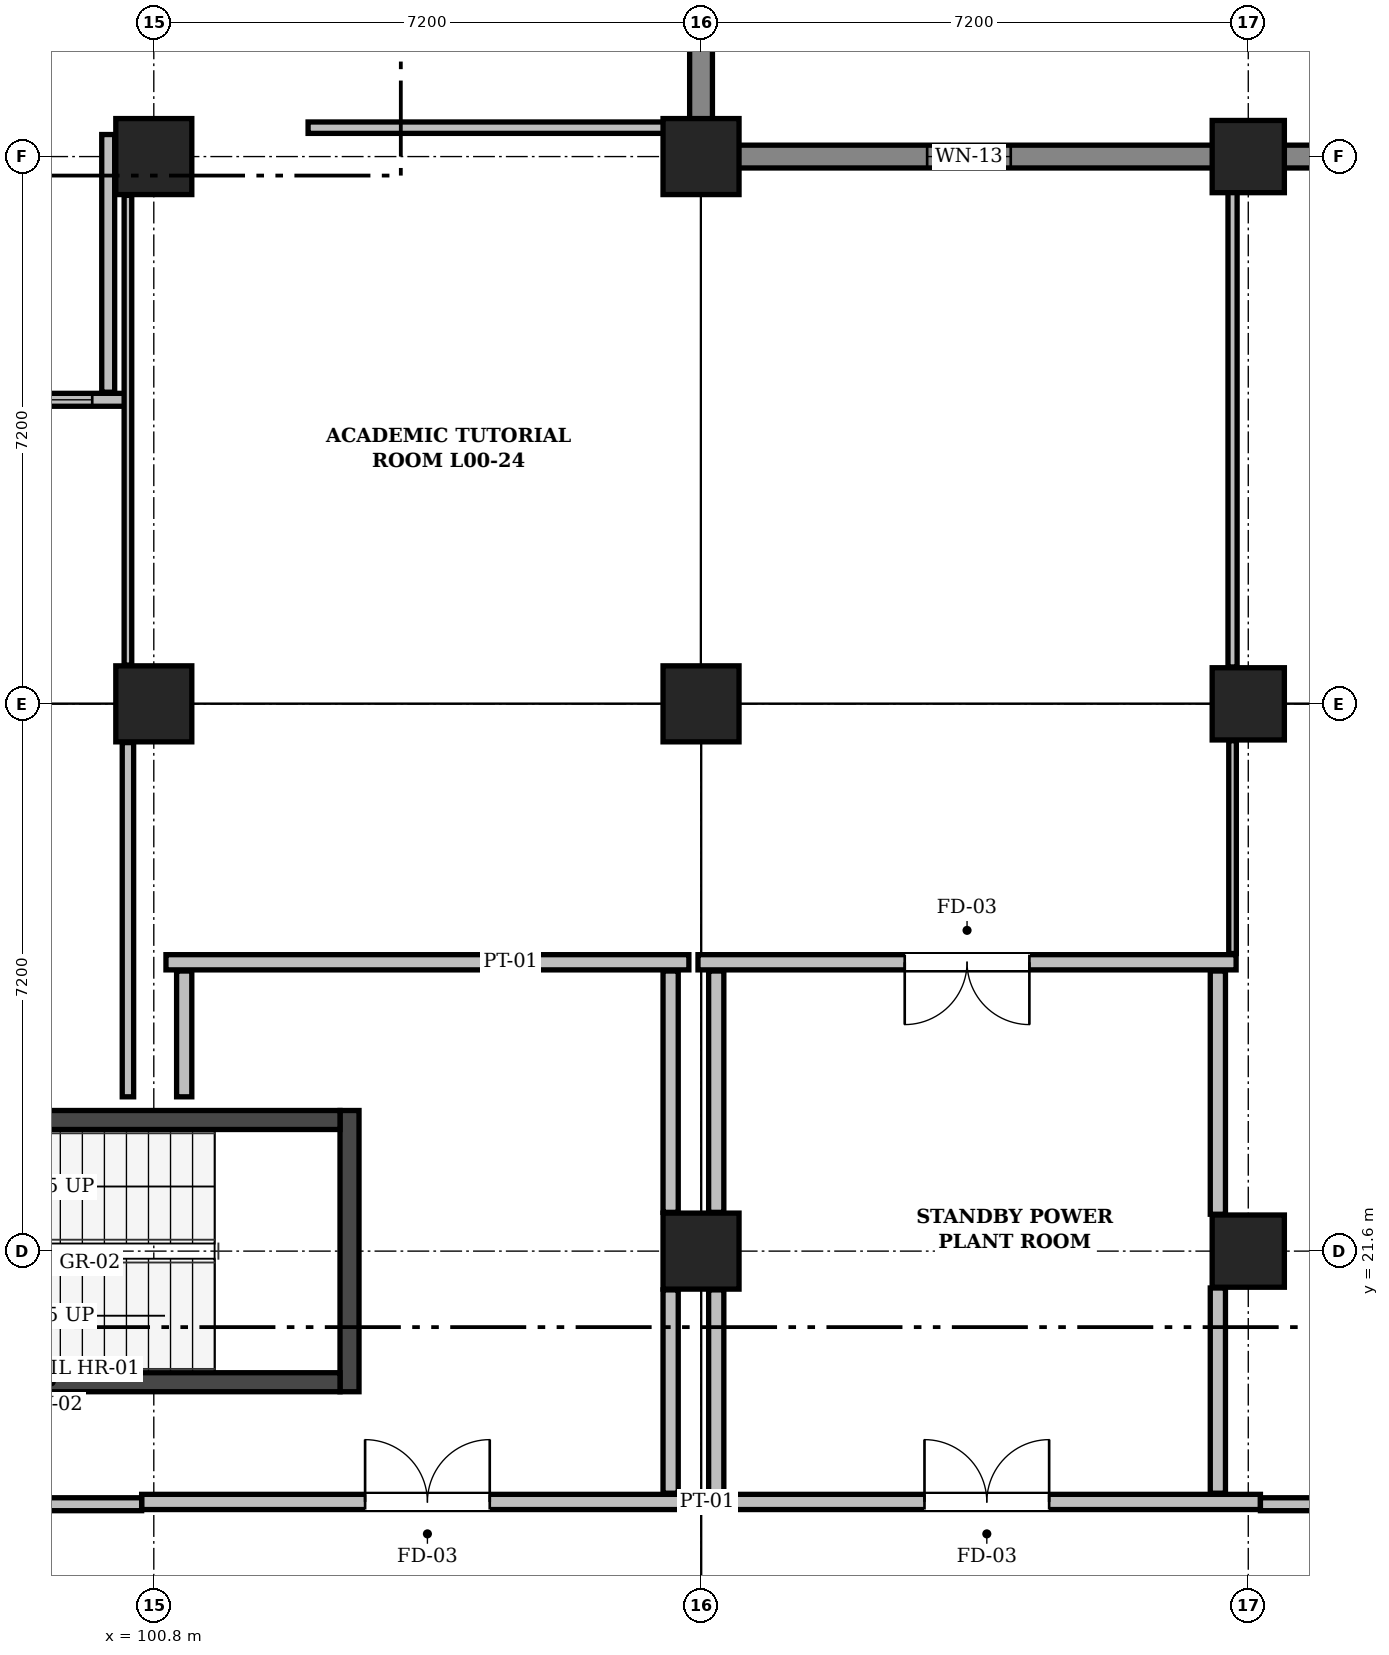
"""IFC4 building model, lengths in metres.
Left out: names, types, materials, properties, quantities, classifications, styles, units other than length and angle.
Written with IfcOpenShell. Run it as: python <this file> out.ifc"""

import sys

from ifc_helpers import new_model, si_unit, direction, frame, frame_2d, origin, origin_2d, place, context, subcontext, project, spatial, rectangle, extrude, element, fill, save


model = new_model("IFC4")
c1 = context("Model", 3, precision=1e-05, world=origin(), true_north=direction((0.0, 1.0)))
c2 = subcontext(c1, "Body", "Model", "MODEL_VIEW")
j1 = project(units=[si_unit("LENGTHUNIT", "METRE"), si_unit("PLANEANGLEUNIT", "RADIAN")], contexts=[c1])
p1 = place(None, origin())
s1 = spatial("IfcSite", under=j1, at=p1, CompositionType="ELEMENT")
p2 = place(p1, origin())
s2 = spatial("IfcBuilding", under=s1, at=p2, CompositionType="ELEMENT")
p3 = place(p2, origin())
s3 = spatial("IfcBuildingStorey", under=s2, at=p3, CompositionType="ELEMENT", Elevation=0.0)
for number, where, z_axis, x_axis in (
    (1, (100.8, 28.8, 0.0), (0.0, 0.0, 1.0), (1.0, 0.0, 0.0)),
    (2, (100.8, 36.0, 0.0), (0.0, 0.0, 1.0), (1.0, 0.0, 0.0)),
    (3, (108.0, 21.6, 0.0), (0.0, 0.0, 1.0), (1.0, 0.0, 0.0)),
    (4, (108.0, 28.8, 0.0), (0.0, 0.0, 1.0), (1.0, 0.0, 0.0)),
    (5, (108.0, 36.0, 0.0), (0.0, 0.0, 1.0), (1.0, 0.0, 0.0)),
):
    element("IfcColumn", number, at=place(p3, frame(where, z_axis=z_axis, x_axis=x_axis)), inside=s3, PredefinedType="COLUMN", context=c2, shape_type="SweptSolid", body=[
        extrude(rectangle(XDim=1.0, YDim=1.0, at=origin_2d()), origin(), (0.0, 0.0, 1.0), 4.8),
    ])
for number, where, z_axis, x_axis in (
    (6, (115.2, 21.6, 0.0), (0.0, 0.0, 1.0), (1.0, 0.0, 0.0)),
    (7, (115.2, 28.8, 0.0), (0.0, 0.0, 1.0), (1.0, 0.0, 0.0)),
    (8, (115.2, 36.0, 0.0), (0.0, 0.0, 1.0), (1.0, 0.0, 0.0)),
):
    element("IfcColumn", number, at=place(p3, frame(where, z_axis=z_axis, x_axis=x_axis)), inside=s3, PredefinedType="COLUMN", context=c2, shape_type="SweptSolid", body=[
        extrude(rectangle(XDim=0.95, YDim=0.95, at=origin_2d()), origin(), (0.0, 0.0, 1.0), 4.8),
    ])
p4 = place(p3, frame((107.85, 36.0, 0.0), z_axis=(0.0, 0.0, 1.0), x_axis=(1.0, 0.0, 0.0)))
e9 = element("IfcWall", 9, at=p4, inside=s3, PredefinedType="SOLIDWALL", context=c2, shape_type="SweptSolid", body=[
    extrude(rectangle(XDim=7.35, YDim=0.3, at=frame_2d((3.675, 0.0))), origin(), (0.0, 0.0, 1.0), 4.52),
])
p5 = place(p4, frame((3.125, 0.0, 0.95)))
e10 = element("IfcOpeningElement", 10, at=p5, cuts=e9, PredefinedType="OPENING", context=c2, shape_type="SweptSolid", body=[
    extrude(rectangle(XDim=1.1, YDim=1.55, at=frame_2d((0.55, 0.775))), frame((0.0, 0.162, 0.0), z_axis=(0.0, -1.0, 0.0), x_axis=(1.0, 0.0, 0.0)), (0.0, 0.0, 1.0), 0.324),
])
p6 = place(p3, frame((115.2, 36.0, 0.0), z_axis=(0.0, 0.0, 1.0), x_axis=(1.0, 0.0, 0.0)))
e11 = element("IfcWall", 11, at=p6, inside=s3, PredefinedType="SOLIDWALL", context=c2, shape_type="SweptSolid", body=[
    extrude(rectangle(XDim=7.2, YDim=0.3, at=frame_2d((3.6, 0.0))), origin(), (0.0, 0.0, 1.0), 4.52),
])
p7 = place(p6, frame((2.975, 0.0, 0.95)))
e12 = element("IfcOpeningElement", 12, at=p7, cuts=e11, PredefinedType="OPENING", context=c2, shape_type="SweptSolid", body=[
    extrude(rectangle(XDim=1.25, YDim=1.55, at=frame_2d((0.625, 0.775))), frame((0.0, 0.162, 0.0), z_axis=(0.0, -1.0, 0.0), x_axis=(1.0, 0.0, 0.0)), (0.0, 0.0, 1.0), 0.324),
])
p8 = place(p3, frame((108.0, 43.2, 0.0), z_axis=(0.0, 0.0, 1.0), x_axis=(0.0, -1.0, 0.0)))
e13 = element("IfcWall", 13, at=p8, inside=s3, PredefinedType="SOLIDWALL", context=c2, shape_type="SweptSolid", body=[
    extrude(rectangle(XDim=7.048, YDim=0.3, at=frame_2d((3.524, 0.0))), origin(), (0.0, 0.0, 1.0), 4.52),
])
p9 = place(p8, frame((2.549, 0.0, 0.95)))
e14 = element("IfcOpeningElement", 14, at=p9, cuts=e13, PredefinedType="OPENING", context=c2, shape_type="SweptSolid", body=[
    extrude(rectangle(XDim=1.95, YDim=1.8, at=frame_2d((0.975, 0.9))), frame((0.0, 0.162, 0.0), z_axis=(0.0, -1.0, 0.0), x_axis=(1.0, 0.0, 0.0)), (0.0, 0.0, 1.0), 0.324),
])
p10 = place(p3, frame((103.375, 19.75, 0.0), z_axis=(0.0, 0.0, 1.0), x_axis=(0.0, 1.0, 0.0)))
e15 = element("IfcWall", 15, at=p10, inside=s3, PredefinedType="SHEAR", context=c2, shape_type="SweptSolid", body=[
    extrude(rectangle(XDim=3.7, YDim=0.25, at=frame_2d((1.85, 0.0))), origin(), (0.0, 0.0, 1.0), 4.55),
])
for number, where, z_axis, x_axis in (
    (16, (95.65, 19.875, 0.0), (0.0, 0.0, 1.0), (1.0, 0.0, 0.0)),
    (17, (95.65, 23.325, 0.0), (0.0, 0.0, 1.0), (1.0, 0.0, 0.0)),
):
    element("IfcWall", number, at=place(p3, frame(where, z_axis=z_axis, x_axis=x_axis)), inside=s3, PredefinedType="SHEAR", context=c2, shape_type="SweptSolid", body=[
        extrude(rectangle(XDim=7.6, YDim=0.25, at=frame_2d((3.8, 0.0))), origin(), (0.0, 0.0, 1.0), 4.55),
    ])
p11 = place(p3, frame((100.64, 18.3, 0.0), z_axis=(0.0, 0.0, 1.0), x_axis=(1.0, 0.0, 0.0)))
e18 = element("IfcWall", 18, at=p11, inside=s3, PredefinedType="PARTITIONING", context=c2, shape_type="SweptSolid", body=[
    extrude(rectangle(XDim=7.52, YDim=0.2, at=frame_2d((3.76, 0.0))), origin(), (0.0, 0.0, 1.0), 4.46),
])
p12 = place(p11, frame((2.94, 0.0, 0.0)))
e19 = element("IfcOpeningElement", 19, at=p12, cuts=e18, PredefinedType="OPENING", context=c2, shape_type="SweptSolid", body=[
    extrude(rectangle(XDim=1.64, YDim=2.24, at=frame_2d((0.82, 1.12))), frame((0.0, 0.112, 0.0), z_axis=(0.0, -1.0, 0.0), x_axis=(1.0, 0.0, 0.0)), (0.0, 0.0, 1.0), 0.224),
])
p13 = place(p3, frame((100.96, 25.4, 0.0), z_axis=(0.0, 0.0, 1.0), x_axis=(1.0, 0.0, 0.0)))
e20 = element("IfcWall", 20, at=p13, inside=s3, PredefinedType="PARTITIONING", context=c2, shape_type="SweptSolid", body=[
    extrude(rectangle(XDim=6.88, YDim=0.2, at=frame_2d((3.44, 0.0))), origin(), (0.0, 0.0, 1.0), 4.46),
])
p14 = place(p3, frame((107.6, 22.11, 0.0), z_axis=(0.0, 0.0, 1.0), x_axis=(0.0, 1.0, 0.0)))
e21 = element("IfcWall", 21, at=p14, inside=s3, PredefinedType="PARTITIONING", context=c2, shape_type="SweptSolid", body=[
    extrude(rectangle(XDim=3.175, YDim=0.2, at=frame_2d((1.587, 0.0))), origin(), (0.0, 0.0, 1.0), 4.46),
])
p15 = place(p3, frame((107.6, 18.415, 0.0), z_axis=(0.0, 0.0, 1.0), x_axis=(0.0, 1.0, 0.0)))
e22 = element("IfcWall", 22, at=p15, inside=s3, PredefinedType="PARTITIONING", context=c2, shape_type="SweptSolid", body=[
    extrude(rectangle(XDim=2.675, YDim=0.2, at=frame_2d((1.337, 0.0))), origin(), (0.0, 0.0, 1.0), 4.46),
])
p16 = place(p3, frame((101.2, 23.63, 0.0), z_axis=(0.0, 0.0, 1.0), x_axis=(0.0, 1.0, 0.0)))
e23 = element("IfcWall", 23, at=p16, inside=s3, PredefinedType="PARTITIONING", context=c2, shape_type="SweptSolid", body=[
    extrude(rectangle(XDim=1.655, YDim=0.2, at=frame_2d((0.828, 0.0))), origin(), (0.0, 0.0, 1.0), 4.46),
])
p17 = place(p3, frame((108.16, 18.3, 0.0), z_axis=(0.0, 0.0, 1.0), x_axis=(1.0, 0.0, 0.0)))
e24 = element("IfcWall", 24, at=p17, inside=s3, PredefinedType="PARTITIONING", context=c2, shape_type="SweptSolid", body=[
    extrude(rectangle(XDim=7.2, YDim=0.2, at=frame_2d((3.6, 0.0))), origin(), (0.0, 0.0, 1.0), 4.46),
])
p18 = place(p17, frame((2.78, 0.0, 0.0)))
e25 = element("IfcOpeningElement", 25, at=p18, cuts=e24, PredefinedType="OPENING", context=c2, shape_type="SweptSolid", body=[
    extrude(rectangle(XDim=1.64, YDim=2.24, at=frame_2d((0.82, 1.12))), frame((0.0, 0.112, 0.0), z_axis=(0.0, -1.0, 0.0), x_axis=(1.0, 0.0, 0.0)), (0.0, 0.0, 1.0), 0.224),
])
p19 = place(p3, frame((107.96, 25.4, 0.0), z_axis=(0.0, 0.0, 1.0), x_axis=(1.0, 0.0, 0.0)))
e26 = element("IfcWall", 26, at=p19, inside=s3, PredefinedType="PARTITIONING", context=c2, shape_type="SweptSolid", body=[
    extrude(rectangle(XDim=7.08, YDim=0.2, at=frame_2d((3.54, 0.0))), origin(), (0.0, 0.0, 1.0), 4.46),
])
p20 = place(p19, frame((2.72, 0.0, 0.0)))
e27 = element("IfcOpeningElement", 27, at=p20, cuts=e26, PredefinedType="OPENING", context=c2, shape_type="SweptSolid", body=[
    extrude(rectangle(XDim=1.64, YDim=2.24, at=frame_2d((0.82, 1.12))), frame((0.0, 0.112, 0.0), z_axis=(0.0, -1.0, 0.0), x_axis=(1.0, 0.0, 0.0)), (0.0, 0.0, 1.0), 0.224),
])
p21 = place(p3, frame((114.8, 22.085, 0.0), z_axis=(0.0, 0.0, 1.0), x_axis=(0.0, 1.0, 0.0)))
e28 = element("IfcWall", 28, at=p21, inside=s3, PredefinedType="PARTITIONING", context=c2, shape_type="SweptSolid", body=[
    extrude(rectangle(XDim=3.2, YDim=0.2, at=frame_2d((1.6, 0.0))), origin(), (0.0, 0.0, 1.0), 4.46),
])
p22 = place(p3, frame((114.8, 18.415, 0.0), z_axis=(0.0, 0.0, 1.0), x_axis=(0.0, 1.0, 0.0)))
e29 = element("IfcWall", 29, at=p22, inside=s3, PredefinedType="PARTITIONING", context=c2, shape_type="SweptSolid", body=[
    extrude(rectangle(XDim=2.7, YDim=0.2, at=frame_2d((1.35, 0.0))), origin(), (0.0, 0.0, 1.0), 4.46),
])
p23 = place(p3, frame((108.2, 22.11, 0.0), z_axis=(0.0, 0.0, 1.0), x_axis=(0.0, 1.0, 0.0)))
e30 = element("IfcWall", 30, at=p23, inside=s3, PredefinedType="PARTITIONING", context=c2, shape_type="SweptSolid", body=[
    extrude(rectangle(XDim=3.175, YDim=0.2, at=frame_2d((1.587, 0.0))), origin(), (0.0, 0.0, 1.0), 4.08),
])
p24 = place(p3, frame((108.2, 18.415, 0.0), z_axis=(0.0, 0.0, 1.0), x_axis=(0.0, 1.0, 0.0)))
e31 = element("IfcWall", 31, at=p24, inside=s3, PredefinedType="PARTITIONING", context=c2, shape_type="SweptSolid", body=[
    extrude(rectangle(XDim=2.675, YDim=0.2, at=frame_2d((1.337, 0.0))), origin(), (0.0, 0.0, 1.0), 4.08),
])
p25 = place(p3, frame((97.788, 18.27, 0.0), z_axis=(0.0, 0.0, 1.0), x_axis=(1.0, 0.0, 0.0)))
e32 = element("IfcWall", 32, at=p25, inside=s3, PredefinedType="PARTITIONING", context=c2, shape_type="SweptSolid", body=[
    extrude(rectangle(XDim=2.852, YDim=0.17, at=frame_2d((1.426, 0.0))), origin(), (0.0, 0.0, 1.0), 4.46),
])
p26 = place(p3, frame((115.36, 18.27, 0.0), z_axis=(0.0, 0.0, 1.0), x_axis=(1.0, 0.0, 0.0)))
e33 = element("IfcWall", 33, at=p26, inside=s3, PredefinedType="PARTITIONING", context=c2, shape_type="SweptSolid", body=[
    extrude(rectangle(XDim=13.34, YDim=0.17, at=frame_2d((6.67, 0.0))), origin(), (0.0, 0.0, 1.0), 4.46),
])
p27 = place(p26, frame((6.15, 0.0, 0.0)))
e34 = element("IfcOpeningElement", 34, at=p27, cuts=e33, PredefinedType="OPENING", context=c2, shape_type="SweptSolid", body=[
    extrude(rectangle(XDim=1.04, YDim=2.18, at=frame_2d((0.52, 1.09))), frame((0.0, 0.097, 0.0), z_axis=(0.0, -1.0, 0.0), x_axis=(1.0, 0.0, 0.0)), (0.0, 0.0, 1.0), 0.194),
])
p28 = place(p26, frame((9.79, 0.0, 1.05)))
e35 = element("IfcOpeningElement", 35, at=p28, cuts=e33, PredefinedType="OPENING", context=c2, shape_type="SweptSolid", body=[
    extrude(rectangle(XDim=3.1, YDim=1.15, at=frame_2d((1.55, 0.575))), frame((0.0, 0.097, 0.0), z_axis=(0.0, -1.0, 0.0), x_axis=(1.0, 0.0, 0.0)), (0.0, 0.0, 1.0), 0.194),
])
p29 = place(p3, frame((85.963, 32.8, 0.0), z_axis=(0.0, 0.0, 1.0), x_axis=(1.0, 0.0, 0.0)))
e36 = element("IfcWall", 36, at=p29, inside=s3, PredefinedType="PARTITIONING", context=c2, shape_type="SweptSolid", body=[
    extrude(rectangle(XDim=14.477, YDim=0.17, at=frame_2d((7.238, 0.0))), origin(), (0.0, 0.0, 1.0), 4.46),
])
p30 = place(p29, frame((6.498, 0.0, 0.0)))
e37 = element("IfcOpeningElement", 37, at=p30, cuts=e36, PredefinedType="OPENING", context=c2, shape_type="SweptSolid", body=[
    extrude(rectangle(XDim=1.48, YDim=2.26, at=frame_2d((0.74, 1.13))), frame((0.0, 0.097, 0.0), z_axis=(0.0, -1.0, 0.0), x_axis=(1.0, 0.0, 0.0)), (0.0, 0.0, 1.0), 0.194),
])
p31 = place(p29, frame((11.927, 0.0, 1.05)))
e38 = element("IfcOpeningElement", 38, at=p31, cuts=e36, PredefinedType="OPENING", context=c2, shape_type="SweptSolid", body=[
    extrude(rectangle(XDim=2.1, YDim=1.05, at=frame_2d((1.05, 0.525))), frame((0.0, 0.097, 0.0), z_axis=(0.0, -1.0, 0.0), x_axis=(1.0, 0.0, 0.0)), (0.0, 0.0, 1.0), 0.194),
])
p32 = place(p3, frame((100.2, 32.9, 0.0), z_axis=(0.0, 0.0, 1.0), x_axis=(0.0, 1.0, 0.0)))
e39 = element("IfcWall", 39, at=p32, inside=s3, PredefinedType="PARTITIONING", context=c2, shape_type="SweptSolid", body=[
    extrude(rectangle(XDim=3.39, YDim=0.17, at=frame_2d((1.695, 0.0))), origin(), (0.0, 0.0, 1.0), 4.46),
])
p33 = place(p3, frame((100.46, 29.31, 0.0), z_axis=(0.0, 0.0, 1.0), x_axis=(0.0, 1.0, 0.0)))
e40 = element("IfcWall", 40, at=p33, inside=s3, PredefinedType="PARTITIONING", context=c2, shape_type="SweptSolid", body=[
    extrude(rectangle(XDim=6.18, YDim=0.1, at=frame_2d((3.09, 0.0))), origin(), (0.0, 0.0, 1.0), 4.46),
])
p34 = place(p3, frame((100.46, 23.63, 0.0), z_axis=(0.0, 0.0, 1.0), x_axis=(0.0, 1.0, 0.0)))
e41 = element("IfcWall", 41, at=p34, inside=s3, PredefinedType="PARTITIONING", context=c2, shape_type="SweptSolid", body=[
    extrude(rectangle(XDim=4.66, YDim=0.15, at=frame_2d((2.33, 0.0))), origin(), (0.0, 0.0, 1.0), 4.46),
])
p35 = place(p3, frame((102.83, 36.38, 0.0), z_axis=(0.0, 0.0, 1.0), x_axis=(1.0, 0.0, 0.0)))
e42 = element("IfcWall", 42, at=p35, inside=s3, PredefinedType="PARTITIONING", context=c2, shape_type="SweptSolid", body=[
    extrude(rectangle(XDim=5.008, YDim=0.15, at=frame_2d((2.504, 0.0))), origin(), (0.0, 0.0, 1.0), 3.83),
])
p36 = place(p3, frame((114.993, 29.285, 0.0), z_axis=(0.0, 0.0, 1.0), x_axis=(0.0, 1.0, 0.0)))
e43 = element("IfcWall", 43, at=p36, inside=s3, PredefinedType="PARTITIONING", context=c2, shape_type="SweptSolid", body=[
    extrude(rectangle(XDim=6.553, YDim=0.12, at=frame_2d((3.276, 0.0))), origin(), (0.0, 0.0, 1.0), 4.08),
])
p37 = place(p3, frame((114.993, 25.515, 0.0), z_axis=(0.0, 0.0, 1.0), x_axis=(0.0, 1.0, 0.0)))
e44 = element("IfcWall", 44, at=p37, inside=s3, PredefinedType="PARTITIONING", context=c2, shape_type="SweptSolid", body=[
    extrude(rectangle(XDim=2.8, YDim=0.1, at=frame_2d((1.4, 0.0))), origin(), (0.0, 0.0, 1.0), 4.08),
])
p38 = place(p5, origin())
e45 = element("IfcWindow", 45, at=p38, inside=s3, PartitioningType="SINGLE_PANEL", PredefinedType="WINDOW", context=c2, shape_type="SweptSolid", body=[
    extrude(rectangle(XDim=1.1, YDim=1.55, at=frame_2d((0.55, 0.775))), frame((0.0, 0.03, 0.0), z_axis=(0.0, -1.0, 0.0), x_axis=(1.0, 0.0, 0.0)), (0.0, 0.0, 1.0), 0.06),
])
fill(e10, e45)
p39 = place(p31, origin())
e46 = element("IfcWindow", 46, at=p39, inside=s3, PartitioningType="SINGLE_PANEL", PredefinedType="WINDOW", context=c2, shape_type="SweptSolid", body=[
    extrude(rectangle(XDim=2.1, YDim=1.05, at=frame_2d((1.05, 0.525))), frame((0.0, 0.03, 0.0), z_axis=(0.0, -1.0, 0.0), x_axis=(1.0, 0.0, 0.0)), (0.0, 0.0, 1.0), 0.06),
])
fill(e38, e46)
p40 = place(p12, origin())
e47 = element("IfcDoor", 47, at=p40, inside=s3, OperationType="DOUBLE_DOOR_SINGLE_SWING", PredefinedType="DOOR", context=c2, shape_type="SweptSolid", body=[
    extrude(rectangle(XDim=1.64, YDim=2.24, at=frame_2d((0.82, 1.12))), frame((0.0, 0.025, 0.0), z_axis=(0.0, -1.0, 0.0), x_axis=(1.0, 0.0, 0.0)), (0.0, 0.0, 1.0), 0.05),
])
fill(e19, e47)
p41 = place(p18, origin())
e48 = element("IfcDoor", 48, at=p41, inside=s3, OperationType="DOUBLE_DOOR_SINGLE_SWING", PredefinedType="DOOR", context=c2, shape_type="SweptSolid", body=[
    extrude(rectangle(XDim=1.64, YDim=2.24, at=frame_2d((0.82, 1.12))), frame((0.0, 0.025, 0.0), z_axis=(0.0, -1.0, 0.0), x_axis=(1.0, 0.0, 0.0)), (0.0, 0.0, 1.0), 0.05),
])
fill(e25, e48)
p42 = place(p20, frame((1.64, 0.0, 0.0), z_axis=(0.0, 0.0, 1.0), x_axis=(-1.0, 0.0, 0.0)))
e49 = element("IfcDoor", 49, at=p42, inside=s3, OperationType="DOUBLE_DOOR_SINGLE_SWING", PredefinedType="DOOR", context=c2, shape_type="SweptSolid", body=[
    extrude(rectangle(XDim=1.64, YDim=2.24, at=frame_2d((0.82, 1.12))), frame((0.0, 0.025, 0.0), z_axis=(0.0, -1.0, 0.0), x_axis=(1.0, 0.0, 0.0)), (0.0, 0.0, 1.0), 0.05),
])
fill(e27, e49)
save(model, sys.argv[1])
